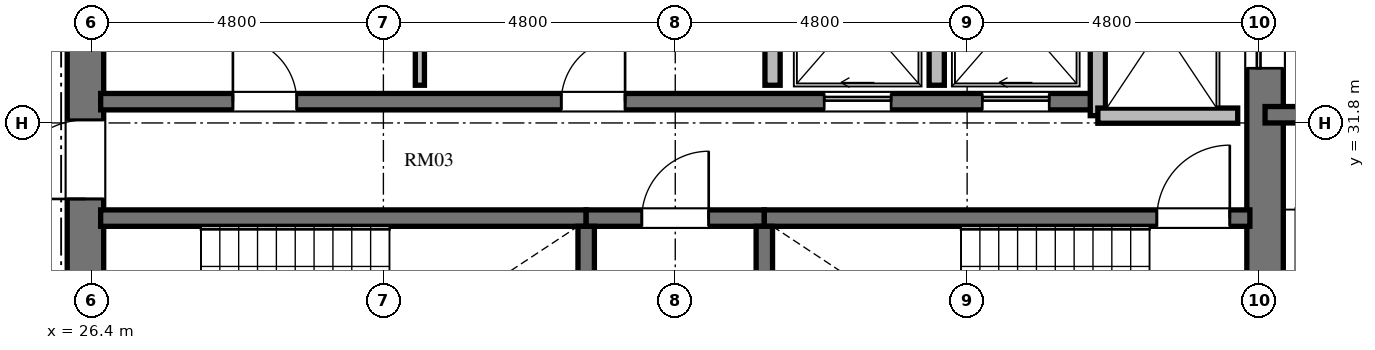
"""IFC4 building model, lengths in metres.
Left out: names, types, materials, properties, quantities, classifications, styles, units other than length and angle.
Written with IfcOpenShell. Run it as: python <this file> out.ifc"""

import sys

from ifc_helpers import new_model, si_unit, direction, frame, frame_2d, origin, place, context, subcontext, project, spatial, rectangle, extrude, element, fill, save


model = new_model("IFC4")
c1 = context("Model", 3, precision=1e-05, world=origin(), true_north=direction((0.0, 1.0)))
c2 = subcontext(c1, "Body", "Model", "MODEL_VIEW")
j1 = project(units=[si_unit("LENGTHUNIT", "METRE"), si_unit("PLANEANGLEUNIT", "RADIAN")], contexts=[c1])
p1 = place(None, origin())
s1 = spatial("IfcSite", under=j1, at=p1, CompositionType="ELEMENT")
p2 = place(p1, origin())
s2 = spatial("IfcBuilding", under=s1, at=p2, CompositionType="ELEMENT")
p3 = place(p2, frame((0.0, 0.0, 227.664)))
s3 = spatial("IfcBuildingStorey", under=s2, at=p3, CompositionType="ELEMENT", Elevation=227.664)
p4 = place(p3, frame((26.3, 20.95, 0.0), z_axis=(0.0, 0.0, 1.0), x_axis=(0.0, 1.0, 0.0)))
e1 = element("IfcWall", 1, at=p4, inside=s3, PredefinedType="SHEAR", context=c2, shape_type="SweptSolid", body=[
    extrude(rectangle(XDim=14.1, YDim=0.6, at=frame_2d((7.05, 0.0))), origin(), (0.0, 0.0, 1.0), 3.648),
])
p5 = place(p4, frame((6.5, 0.0, 0.0)))
e2 = element("IfcOpeningElement", 2, at=p5, cuts=e1, PredefinedType="OPENING", context=c2, shape_type="SweptSolid", body=[
    extrude(rectangle(XDim=1.2, YDim=2.15, at=frame_2d((0.6, 1.075))), frame((0.0, 0.31, 0.0), z_axis=(0.0, -1.0, 0.0), x_axis=(1.0, 0.0, 0.0)), (0.0, 0.0, 1.0), 0.62),
])
p6 = place(p4, frame((9.6, 0.0, 0.0)))
e3 = element("IfcOpeningElement", 3, at=p6, cuts=e1, PredefinedType="OPENING", context=c2, shape_type="SweptSolid", body=[
    extrude(rectangle(XDim=1.3, YDim=2.2, at=frame_2d((0.65, 1.1))), frame((0.0, 0.31, 0.0), z_axis=(0.0, -1.0, 0.0), x_axis=(1.0, 0.0, 0.0)), (0.0, 0.0, 1.0), 0.62),
])
p7 = place(p4, frame((3.26, 0.0, 0.0)))
e4 = element("IfcOpeningElement", 4, at=p7, cuts=e1, PredefinedType="OPENING", context=c2, shape_type="SweptSolid", body=[
    extrude(rectangle(XDim=1.3, YDim=2.2, at=frame_2d((0.65, 1.1))), frame((0.0, 0.31, 0.0), z_axis=(0.0, -1.0, 0.0), x_axis=(1.0, 0.0, 0.0)), (0.0, 0.0, 1.0), 0.62),
])
p8 = place(p3, frame((45.7, 20.95, 0.0), z_axis=(0.0, 0.0, 1.0), x_axis=(0.0, 1.0, 0.0)))
e5 = element("IfcWall", 5, at=p8, inside=s3, PredefinedType="SHEAR", context=c2, shape_type="SweptSolid", body=[
    extrude(rectangle(XDim=14.1, YDim=0.6, at=frame_2d((7.05, 0.0))), origin(), (0.0, 0.0, 1.0), 3.648),
])
p9 = place(p8, frame((11.75, 0.0, 0.0)))
e6 = element("IfcOpeningElement", 6, at=p9, cuts=e5, PredefinedType="OPENING", context=c2, shape_type="SweptSolid", body=[
    extrude(rectangle(XDim=1.4, YDim=2.3, at=frame_2d((0.7, 1.15))), frame((0.0, 0.31, 0.0), z_axis=(0.0, -1.0, 0.0), x_axis=(1.0, 0.0, 0.0)), (0.0, 0.0, 1.0), 0.62),
])
p10 = place(p8, frame((0.95, 0.0, 0.0)))
e7 = element("IfcOpeningElement", 7, at=p10, cuts=e5, PredefinedType="OPENING", context=c2, shape_type="SweptSolid", body=[
    extrude(rectangle(XDim=1.4, YDim=2.3, at=frame_2d((0.7, 1.15))), frame((0.0, 0.31, 0.0), z_axis=(0.0, -1.0, 0.0), x_axis=(1.0, 0.0, 0.0)), (0.0, 0.0, 1.0), 0.62),
])
p11 = place(p3, frame((26.55, 30.235, 0.0), z_axis=(0.0, 0.0, 1.0), x_axis=(1.0, 0.0, 0.0)))
e8 = element("IfcWall", 8, at=p11, inside=s3, PredefinedType="SHEAR", context=c2, shape_type="SweptSolid", body=[
    extrude(rectangle(XDim=7.985, YDim=0.27, at=frame_2d((3.992, 0.0))), origin(), (0.0, 0.0, 1.0), 3.648),
])
p12 = place(p3, frame((34.535, 30.235, 0.0), z_axis=(0.0, 0.0, 1.0), x_axis=(1.0, 0.0, 0.0)))
e9 = element("IfcWall", 9, at=p12, inside=s3, PredefinedType="SHEAR", context=c2, shape_type="SweptSolid", body=[
    extrude(rectangle(XDim=2.93, YDim=0.27, at=frame_2d((1.465, 0.0))), origin(), (0.0, 0.0, 1.0), 3.648),
])
p13 = place(p12, frame((0.915, 0.0, 0.0)))
e10 = element("IfcOpeningElement", 10, at=p13, cuts=e9, PredefinedType="OPENING", context=c2, shape_type="SweptSolid", body=[
    extrude(rectangle(XDim=1.1, YDim=2.15, at=frame_2d((0.55, 1.075))), frame((0.0, 0.145, 0.0), z_axis=(0.0, -1.0, 0.0), x_axis=(1.0, 0.0, 0.0)), (0.0, 0.0, 1.0), 0.29),
])
p14 = place(p3, frame((37.465, 30.235, 0.0), z_axis=(0.0, 0.0, 1.0), x_axis=(1.0, 0.0, 0.0)))
e11 = element("IfcWall", 11, at=p14, inside=s3, PredefinedType="SHEAR", context=c2, shape_type="SweptSolid", body=[
    extrude(rectangle(XDim=7.985, YDim=0.27, at=frame_2d((3.992, 0.0))), origin(), (0.0, 0.0, 1.0), 3.648),
])
p15 = place(p14, frame((6.455, 0.0, 0.0)))
e12 = element("IfcOpeningElement", 12, at=p15, cuts=e11, PredefinedType="OPENING", context=c2, shape_type="SweptSolid", body=[
    extrude(rectangle(XDim=1.2, YDim=2.15, at=frame_2d((0.6, 1.075))), frame((0.0, 0.145, 0.0), z_axis=(0.0, -1.0, 0.0), x_axis=(1.0, 0.0, 0.0)), (0.0, 0.0, 1.0), 0.29),
])
for number, where, z_axis, x_axis in (
    (13, (34.535, 26.02, 0.0), (0.0, 0.0, 1.0), (0.0, 1.0, 0.0)),
    (14, (37.465, 26.02, 0.0), (0.0, 0.0, 1.0), (0.0, 1.0, 0.0)),
):
    element("IfcWall", number, at=place(p3, frame(where, z_axis=z_axis, x_axis=x_axis)), inside=s3, PredefinedType="SHEAR", context=c2, shape_type="SweptSolid", body=[
        extrude(rectangle(XDim=4.08, YDim=0.27, at=frame_2d((2.04, 0.0))), origin(), (0.0, 0.0, 1.0), 3.648),
    ])
p16 = place(p3, frame((26.55, 32.15, 0.0), z_axis=(0.0, 0.0, 1.0), x_axis=(1.0, 0.0, 0.0)))
e15 = element("IfcWall", 15, at=p16, inside=s3, PredefinedType="SHEAR", context=c2, shape_type="SweptSolid", body=[
    extrude(rectangle(XDim=16.4, YDim=0.27, at=frame_2d((8.2, 0.0))), origin(), (0.0, 0.0, 1.0), 3.648),
])
p17 = place(p16, frame((2.175, 0.0, 0.0)))
e16 = element("IfcOpeningElement", 16, at=p17, cuts=e15, PredefinedType="OPENING", context=c2, shape_type="SweptSolid", body=[
    extrude(rectangle(XDim=1.05, YDim=2.15, at=frame_2d((0.525, 1.075))), frame((0.0, 0.145, 0.0), z_axis=(0.0, -1.0, 0.0), x_axis=(1.0, 0.0, 0.0)), (0.0, 0.0, 1.0), 0.29),
])
p18 = place(p16, frame((7.575, 0.0, 0.0)))
e17 = element("IfcOpeningElement", 17, at=p18, cuts=e15, PredefinedType="OPENING", context=c2, shape_type="SweptSolid", body=[
    extrude(rectangle(XDim=1.05, YDim=2.15, at=frame_2d((0.525, 1.075))), frame((0.0, 0.145, 0.0), z_axis=(0.0, -1.0, 0.0), x_axis=(1.0, 0.0, 0.0)), (0.0, 0.0, 1.0), 0.29),
])
p19 = place(p16, frame((11.9, 0.0, 0.0)))
e18 = element("IfcOpeningElement", 18, at=p19, cuts=e15, PredefinedType="OPENING", context=c2, shape_type="SweptSolid", body=[
    extrude(rectangle(XDim=1.1, YDim=2.2, at=frame_2d((0.55, 1.1))), frame((0.0, 0.145, 0.0), z_axis=(0.0, -1.0, 0.0), x_axis=(1.0, 0.0, 0.0)), (0.0, 0.0, 1.0), 0.29),
])
p20 = place(p16, frame((14.5, 0.0, 0.0)))
e19 = element("IfcOpeningElement", 19, at=p20, cuts=e15, PredefinedType="OPENING", context=c2, shape_type="SweptSolid", body=[
    extrude(rectangle(XDim=1.1, YDim=2.2, at=frame_2d((0.55, 1.1))), frame((0.0, 0.145, 0.0), z_axis=(0.0, -1.0, 0.0), x_axis=(1.0, 0.0, 0.0)), (0.0, 0.0, 1.0), 0.29),
])
p21 = place(p3, frame((42.95, 31.92, 0.0), z_axis=(0.0, 0.0, 1.0), x_axis=(0.0, 1.0, 0.0)))
e20 = element("IfcWall", 20, at=p21, inside=s3, PredefinedType="SOLIDWALL", context=c2, shape_type="SweptSolid", body=[
    extrude(rectangle(XDim=3.18, YDim=0.25, at=frame_2d((1.59, 0.0))), origin(), (0.0, 0.0, 1.0), 3.448),
])
p22 = place(p3, frame((42.95, 31.92, 0.0), z_axis=(0.0, 0.0, 1.0), x_axis=(1.0, 0.0, 0.0)))
e21 = element("IfcWall", 21, at=p22, inside=s3, PredefinedType="SOLIDWALL", context=c2, shape_type="SweptSolid", body=[
    extrude(rectangle(XDim=2.3, YDim=0.25, at=frame_2d((1.15, 0.0))), origin(), (0.0, 0.0, 1.0), 3.448),
])
for number, where, z_axis, x_axis in (
    (22, (37.6, 32.42, 0.0), (0.0, 0.0, 1.0), (0.0, 1.0, 0.0)),
    (23, (40.3, 32.42, 0.0), (0.0, 0.0, 1.0), (0.0, 1.0, 0.0)),
):
    element("IfcWall", number, at=place(p3, frame(where, z_axis=z_axis, x_axis=x_axis)), inside=s3, PredefinedType="SOLIDWALL", context=c2, shape_type="SweptSolid", body=[
        extrude(rectangle(XDim=2.68, YDim=0.25, at=frame_2d((1.34, 0.0))), origin(), (0.0, 0.0, 1.0), 3.448),
    ])
p23 = place(p3, frame((31.8, 32.42, 0.0), z_axis=(0.0, 0.0, 1.0), x_axis=(0.0, 1.0, 0.0)))
e24 = element("IfcWall", 24, at=p23, inside=s3, PredefinedType="PARTITIONING", context=c2, shape_type="SweptSolid", body=[
    extrude(rectangle(XDim=2.68, YDim=0.15, at=frame_2d((1.34, 0.0))), origin(), (0.0, 0.0, 1.0), 3.448),
])
p24 = place(p3, frame((45.7, 31.935, 0.0), z_axis=(0.0, 0.0, 1.0), x_axis=(1.0, 0.0, 0.0)))
e25 = element("IfcWall", 25, at=p24, inside=s3, PredefinedType="SHEAR", context=c2, shape_type="SweptSolid", body=[
    extrude(rectangle(XDim=4.715, YDim=0.27, at=frame_2d((2.357, 0.0))), origin(), (0.0, 0.0, 1.0), 3.648),
])
p25 = place(p15, origin())
e26 = element("IfcDoor", 26, at=p25, inside=s3, OperationType="SINGLE_SWING_RIGHT", PredefinedType="DOOR", context=c2, shape_type="SweptSolid", body=[
    extrude(rectangle(XDim=1.2, YDim=2.15, at=frame_2d((0.6, 1.075))), frame((0.0, 0.025, 0.0), z_axis=(0.0, -1.0, 0.0), x_axis=(1.0, 0.0, 0.0)), (0.0, 0.0, 1.0), 0.05),
])
fill(e12, e26)
p26 = place(p13, origin())
e27 = element("IfcDoor", 27, at=p26, inside=s3, OperationType="SINGLE_SWING_RIGHT", PredefinedType="DOOR", context=c2, shape_type="SweptSolid", body=[
    extrude(rectangle(XDim=1.1, YDim=2.15, at=frame_2d((0.55, 1.075))), frame((0.0, 0.025, 0.0), z_axis=(0.0, -1.0, 0.0), x_axis=(1.0, 0.0, 0.0)), (0.0, 0.0, 1.0), 0.05),
])
fill(e10, e27)
p27 = place(p6, origin())
e28 = element("IfcDoor", 28, at=p27, inside=s3, OperationType="SINGLE_SWING_LEFT", PredefinedType="DOOR", context=c2, shape_type="SweptSolid", body=[
    extrude(rectangle(XDim=1.3, YDim=2.2, at=frame_2d((0.65, 1.1))), frame((0.0, 0.025, 0.0), z_axis=(0.0, -1.0, 0.0), x_axis=(1.0, 0.0, 0.0)), (0.0, 0.0, 1.0), 0.05),
])
fill(e3, e28)
p28 = place(p17, origin())
e29 = element("IfcDoor", 29, at=p28, inside=s3, OperationType="SINGLE_SWING_LEFT", PredefinedType="DOOR", context=c2, shape_type="SweptSolid", body=[
    extrude(rectangle(XDim=1.05, YDim=2.15, at=frame_2d((0.525, 1.075))), frame((0.0, 0.025, 0.0), z_axis=(0.0, -1.0, 0.0), x_axis=(1.0, 0.0, 0.0)), (0.0, 0.0, 1.0), 0.05),
])
fill(e16, e29)
p29 = place(p18, origin())
e30 = element("IfcDoor", 30, at=p29, inside=s3, OperationType="SINGLE_SWING_RIGHT", PredefinedType="DOOR", context=c2, shape_type="SweptSolid", body=[
    extrude(rectangle(XDim=1.05, YDim=2.15, at=frame_2d((0.525, 1.075))), frame((0.0, 0.025, 0.0), z_axis=(0.0, -1.0, 0.0), x_axis=(1.0, 0.0, 0.0)), (0.0, 0.0, 1.0), 0.05),
])
fill(e17, e30)
p30 = place(p19, origin())
e31 = element("IfcDoor", 31, at=p30, inside=s3, OperationType="SLIDING_TO_LEFT", PredefinedType="DOOR", context=c2, shape_type="SweptSolid", body=[
    extrude(rectangle(XDim=1.1, YDim=2.2, at=frame_2d((0.55, 1.1))), frame((0.0, 0.025, 0.0), z_axis=(0.0, -1.0, 0.0), x_axis=(1.0, 0.0, 0.0)), (0.0, 0.0, 1.0), 0.05),
])
fill(e18, e31)
p31 = place(p20, origin())
e32 = element("IfcDoor", 32, at=p31, inside=s3, OperationType="SLIDING_TO_LEFT", PredefinedType="DOOR", context=c2, shape_type="SweptSolid", body=[
    extrude(rectangle(XDim=1.1, YDim=2.2, at=frame_2d((0.55, 1.1))), frame((0.0, 0.025, 0.0), z_axis=(0.0, -1.0, 0.0), x_axis=(1.0, 0.0, 0.0)), (0.0, 0.0, 1.0), 0.05),
])
fill(e19, e32)
p32 = place(p9, origin())
e33 = element("IfcDoor", 33, at=p32, inside=s3, OperationType="SLIDING_TO_LEFT", PredefinedType="DOOR", context=c2, shape_type="SweptSolid", body=[
    extrude(rectangle(XDim=1.4, YDim=2.3, at=frame_2d((0.7, 1.15))), frame((0.0, 0.025, 0.0), z_axis=(0.0, -1.0, 0.0), x_axis=(1.0, 0.0, 0.0)), (0.0, 0.0, 1.0), 0.05),
])
fill(e6, e33)
save(model, sys.argv[1])
